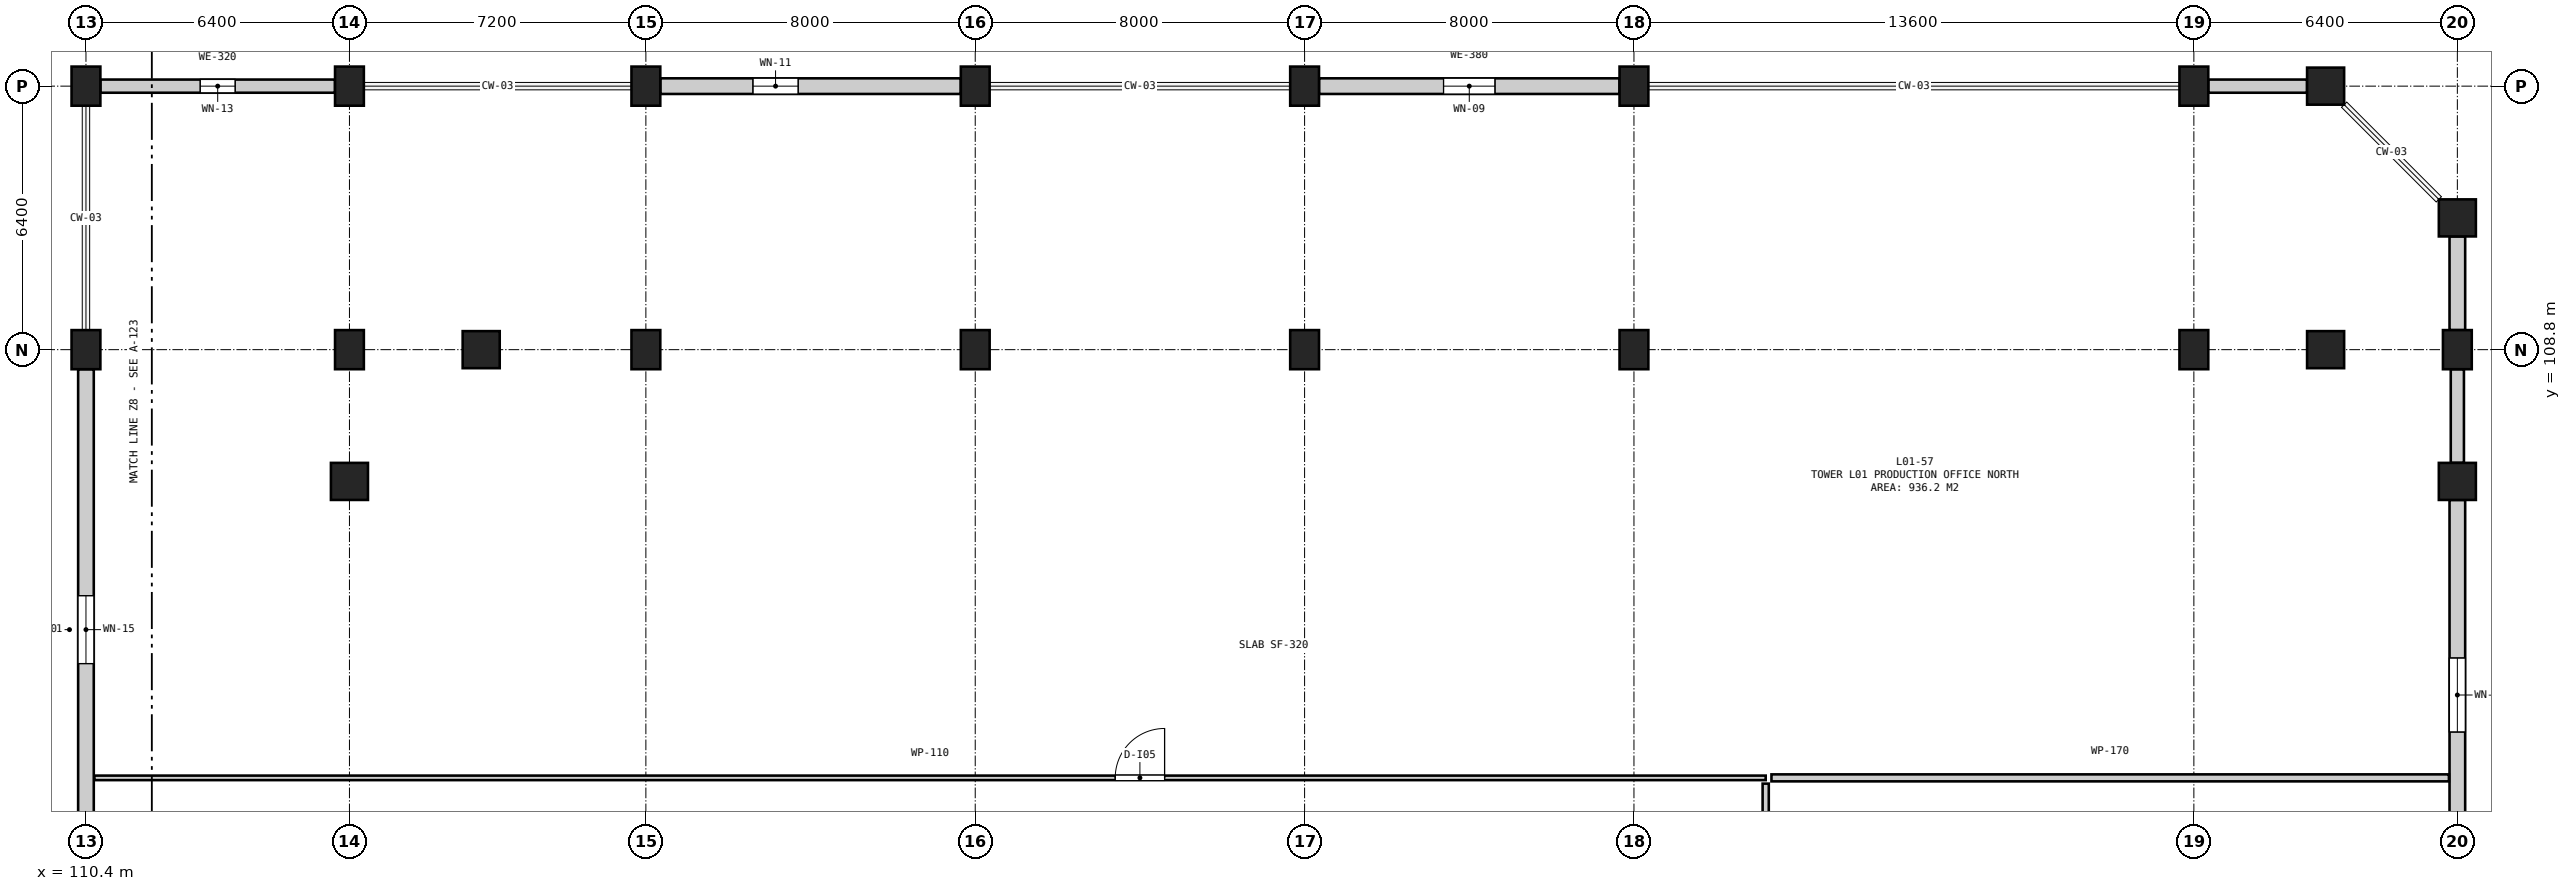
"""IFC4 building model, lengths in metres.
Left out: names, types, materials, properties, quantities, classifications, styles, units other than length and angle.
Written with IfcOpenShell. Run it as: python <this file> out.ifc"""

import sys

from ifc_helpers import new_model, si_unit, direction, frame, frame_2d, origin, origin_2d, place, context, subcontext, project, spatial, rectangle, circle, extrude, element, fill, save


model = new_model("IFC4")
c1 = context("Model", 3, precision=1e-05, world=origin(), true_north=direction((0.0, 1.0)))
c2 = subcontext(c1, "Body", "Model", "MODEL_VIEW")
j1 = project(units=[si_unit("LENGTHUNIT", "METRE"), si_unit("PLANEANGLEUNIT", "RADIAN")], contexts=[c1])
p1 = place(None, origin())
s1 = spatial("IfcSite", under=j1, at=p1, CompositionType="ELEMENT")
p2 = place(p1, origin())
s2 = spatial("IfcBuilding", under=s1, at=p2, CompositionType="ELEMENT")
p3 = place(p2, frame((0.0, 0.0, 5.4)))
s3 = spatial("IfcBuildingStorey", under=s2, at=p3, CompositionType="ELEMENT", Elevation=5.4)
for number, where, z_axis, x_axis in (
    (1, (110.4, 108.8, 0.0), (0.0, 0.0, 1.0), (1.0, 0.0, 0.0)),
    (2, (110.4, 115.2, 0.0), (0.0, 0.0, 1.0), (1.0, 0.0, 0.0)),
):
    element("IfcColumn", number, at=place(p3, frame(where, z_axis=z_axis, x_axis=x_axis)), inside=s3, PredefinedType="COLUMN", context=c2, shape_type="SweptSolid", body=[
        extrude(rectangle(XDim=0.7, YDim=0.95, at=origin_2d()), origin(), (0.0, 0.0, 1.0), 5.4),
    ])
p4 = place(p3, frame((116.8, 105.6, 0.0), z_axis=(0.0, 0.0, 1.0), x_axis=(1.0, 0.0, 0.0)))
e3 = element("IfcColumn", 3, at=p4, inside=s3, PredefinedType="COLUMN", context=c2, shape_type="SweptSolid", body=[
    extrude(circle(Radius=0.45, at=origin_2d()), origin(), (0.0, 0.0, 1.0), 5.4),
])
for number, where, z_axis, x_axis in (
    (4, (116.8, 108.8, 0.0), (0.0, 0.0, 1.0), (1.0, 0.0, 0.0)),
    (5, (116.8, 115.2, 0.0), (0.0, 0.0, 1.0), (1.0, 0.0, 0.0)),
):
    element("IfcColumn", number, at=place(p3, frame(where, z_axis=z_axis, x_axis=x_axis)), inside=s3, PredefinedType="COLUMN", context=c2, shape_type="SweptSolid", body=[
        extrude(rectangle(XDim=0.7, YDim=0.95, at=origin_2d()), origin(), (0.0, 0.0, 1.0), 5.4),
    ])
p5 = place(p3, frame((120.0, 108.8, 0.0), z_axis=(0.0, 0.0, 1.0), x_axis=(1.0, 0.0, 0.0)))
e6 = element("IfcColumn", 6, at=p5, inside=s3, PredefinedType="COLUMN", context=c2, shape_type="SweptSolid", body=[
    extrude(circle(Radius=0.45, at=origin_2d()), origin(), (0.0, 0.0, 1.0), 5.4),
])
for number, where, z_axis, x_axis in (
    (7, (124.0, 108.8, 0.0), (0.0, 0.0, 1.0), (1.0, 0.0, 0.0)),
    (8, (124.0, 115.2, 0.0), (0.0, 0.0, 1.0), (1.0, 0.0, 0.0)),
    (9, (132.0, 108.8, 0.0), (0.0, 0.0, 1.0), (1.0, 0.0, 0.0)),
    (10, (132.0, 115.2, 0.0), (0.0, 0.0, 1.0), (1.0, 0.0, 0.0)),
    (11, (140.0, 108.8, 0.0), (0.0, 0.0, 1.0), (1.0, 0.0, 0.0)),
    (12, (140.0, 115.2, 0.0), (0.0, 0.0, 1.0), (1.0, 0.0, 0.0)),
    (13, (148.0, 108.8, 0.0), (0.0, 0.0, 1.0), (1.0, 0.0, 0.0)),
    (14, (148.0, 115.2, 0.0), (0.0, 0.0, 1.0), (1.0, 0.0, 0.0)),
    (15, (161.6, 108.8, 0.0), (0.0, 0.0, 1.0), (1.0, 0.0, 0.0)),
    (16, (161.6, 115.2, 0.0), (0.0, 0.0, 1.0), (1.0, 0.0, 0.0)),
):
    element("IfcColumn", number, at=place(p3, frame(where, z_axis=z_axis, x_axis=x_axis)), inside=s3, PredefinedType="COLUMN", context=c2, shape_type="SweptSolid", body=[
        extrude(rectangle(XDim=0.7, YDim=0.95, at=origin_2d()), origin(), (0.0, 0.0, 1.0), 5.4),
    ])
for number, where, z_axis, x_axis in (
    (17, (164.8, 108.8, 0.0), (0.0, 0.0, 1.0), (1.0, 0.0, 0.0)),
    (18, (164.8, 115.2, 0.0), (0.0, 0.0, 1.0), (1.0, 0.0, 0.0)),
    (19, (168.0, 105.6, 0.0), (0.0, 0.0, 1.0), (1.0, 0.0, 0.0)),
):
    element("IfcColumn", number, at=place(p3, frame(where, z_axis=z_axis, x_axis=x_axis)), inside=s3, PredefinedType="COLUMN", context=c2, shape_type="SweptSolid", body=[
        extrude(circle(Radius=0.45, at=origin_2d()), origin(), (0.0, 0.0, 1.0), 5.4),
    ])
p6 = place(p3, frame((168.0, 108.8, 0.0), z_axis=(0.0, 0.0, 1.0), x_axis=(1.0, 0.0, 0.0)))
e20 = element("IfcColumn", 20, at=p6, inside=s3, PredefinedType="COLUMN", context=c2, shape_type="SweptSolid", body=[
    extrude(rectangle(XDim=0.7, YDim=0.95, at=origin_2d()), origin(), (0.0, 0.0, 1.0), 5.4),
])
p7 = place(p3, frame((168.0, 112.0, 0.0), z_axis=(0.0, 0.0, 1.0), x_axis=(1.0, 0.0, 0.0)))
e21 = element("IfcColumn", 21, at=p7, inside=s3, PredefinedType="COLUMN", context=c2, shape_type="SweptSolid", body=[
    extrude(circle(Radius=0.45, at=origin_2d()), origin(), (0.0, 0.0, 1.0), 5.4),
])
p8 = place(p3, frame((168.0, 95.675, 0.0), z_axis=(0.0, 0.0, 1.0), x_axis=(0.0, 1.0, 0.0)))
e22 = element("IfcWall", 22, at=p8, inside=s3, PredefinedType="SOLIDWALL", context=c2, shape_type="SweptSolid", body=[
    extrude(rectangle(XDim=9.475, YDim=0.38, at=frame_2d((4.737, 0.0))), origin(), (0.0, 0.0, 1.0), 4.425),
])
p9 = place(p8, frame((3.837, 0.0, 0.9)))
e23 = element("IfcOpeningElement", 23, at=p9, cuts=e22, PredefinedType="OPENING", context=c2, shape_type="SweptSolid", body=[
    extrude(rectangle(XDim=1.8, YDim=2.1, at=frame_2d((0.9, 1.05))), frame((0.0, 0.202, 0.0), z_axis=(0.0, -1.0, 0.0), x_axis=(1.0, 0.0, 0.0)), (0.0, 0.0, 1.0), 0.404),
])
p10 = place(p3, frame((168.0, 106.05, 0.0), z_axis=(0.0, 0.0, 1.0), x_axis=(0.0, 1.0, 0.0)))
e24 = element("IfcWall", 24, at=p10, inside=s3, PredefinedType="SOLIDWALL", context=c2, shape_type="SweptSolid", body=[
    extrude(rectangle(XDim=2.275, YDim=0.32, at=frame_2d((1.137, 0.0))), origin(), (0.0, 0.0, 1.0), 4.425),
])
p11 = place(p3, frame((168.0, 109.275, 0.0), z_axis=(0.0, 0.0, 1.0), x_axis=(0.0, 1.0, 0.0)))
e25 = element("IfcWall", 25, at=p11, inside=s3, PredefinedType="SOLIDWALL", context=c2, shape_type="SweptSolid", body=[
    extrude(rectangle(XDim=2.275, YDim=0.38, at=frame_2d((1.138, 0.0))), origin(), (0.0, 0.0, 1.0), 4.44),
])
p12 = place(p3, frame((164.35, 115.2, 0.0), z_axis=(0.0, 0.0, 1.0), x_axis=(-1.0, 0.0, 0.0)))
e26 = element("IfcWall", 26, at=p12, inside=s3, PredefinedType="SOLIDWALL", context=c2, shape_type="SweptSolid", body=[
    extrude(rectangle(XDim=2.4, YDim=0.32, at=frame_2d((1.2, 0.0))), origin(), (0.0, 0.0, 1.0), 4.44),
])
p13 = place(p3, frame((147.65, 115.2, 0.0), z_axis=(0.0, 0.0, 1.0), x_axis=(-1.0, 0.0, 0.0)))
e27 = element("IfcWall", 27, at=p13, inside=s3, PredefinedType="SOLIDWALL", context=c2, shape_type="SweptSolid", body=[
    extrude(rectangle(XDim=7.3, YDim=0.38, at=frame_2d((3.65, 0.0))), origin(), (0.0, 0.0, 1.0), 4.44),
])
p14 = place(p13, frame((3.025, 0.0, 0.9)))
e28 = element("IfcOpeningElement", 28, at=p14, cuts=e27, PredefinedType="OPENING", context=c2, shape_type="SweptSolid", body=[
    extrude(rectangle(XDim=1.25, YDim=1.9, at=frame_2d((0.625, 0.95))), frame((0.0, 0.202, 0.0), z_axis=(0.0, -1.0, 0.0), x_axis=(1.0, 0.0, 0.0)), (0.0, 0.0, 1.0), 0.404),
])
p15 = place(p3, frame((131.65, 115.2, 0.0), z_axis=(0.0, 0.0, 1.0), x_axis=(-1.0, 0.0, 0.0)))
e29 = element("IfcWall", 29, at=p15, inside=s3, PredefinedType="SOLIDWALL", context=c2, shape_type="SweptSolid", body=[
    extrude(rectangle(XDim=7.3, YDim=0.38, at=frame_2d((3.65, 0.0))), origin(), (0.0, 0.0, 1.0), 4.425),
])
p16 = place(p15, frame((3.95, 0.0, 0.9)))
e30 = element("IfcOpeningElement", 30, at=p16, cuts=e29, PredefinedType="OPENING", context=c2, shape_type="SweptSolid", body=[
    extrude(rectangle(XDim=1.1, YDim=1.55, at=frame_2d((0.55, 0.775))), frame((0.0, 0.202, 0.0), z_axis=(0.0, -1.0, 0.0), x_axis=(1.0, 0.0, 0.0)), (0.0, 0.0, 1.0), 0.404),
])
p17 = place(p3, frame((116.45, 115.2, 0.0), z_axis=(0.0, 0.0, 1.0), x_axis=(-1.0, 0.0, 0.0)))
e31 = element("IfcWall", 31, at=p17, inside=s3, PredefinedType="SOLIDWALL", context=c2, shape_type="SweptSolid", body=[
    extrude(rectangle(XDim=5.7, YDim=0.32, at=frame_2d((2.85, 0.0))), origin(), (0.0, 0.0, 1.0), 4.44),
])
p18 = place(p17, frame((2.425, 0.0, 0.9)))
e32 = element("IfcOpeningElement", 32, at=p18, cuts=e31, PredefinedType="OPENING", context=c2, shape_type="SweptSolid", body=[
    extrude(rectangle(XDim=0.85, YDim=1.35, at=frame_2d((0.425, 0.675))), frame((0.0, 0.172, 0.0), z_axis=(0.0, -1.0, 0.0), x_axis=(1.0, 0.0, 0.0)), (0.0, 0.0, 1.0), 0.344),
])
p19 = place(p3, frame((110.4, 108.325, 0.0), z_axis=(0.0, 0.0, 1.0), x_axis=(0.0, -1.0, 0.0)))
e33 = element("IfcWall", 33, at=p19, inside=s3, PredefinedType="SOLIDWALL", context=c2, shape_type="SweptSolid", body=[
    extrude(rectangle(XDim=12.65, YDim=0.38, at=frame_2d((6.325, 0.0))), origin(), (0.0, 0.0, 1.0), 4.425),
])
p20 = place(p19, frame((5.5, 0.0, 0.9)))
e34 = element("IfcOpeningElement", 34, at=p20, cuts=e33, PredefinedType="OPENING", context=c2, shape_type="SweptSolid", body=[
    extrude(rectangle(XDim=1.65, YDim=2.2, at=frame_2d((0.825, 1.1))), frame((0.0, 0.202, 0.0), z_axis=(0.0, -1.0, 0.0), x_axis=(1.0, 0.0, 0.0)), (0.0, 0.0, 1.0), 0.404),
])
p21 = place(p3, frame((151.34, 98.4, 0.0), z_axis=(0.0, 0.0, 1.0), x_axis=(1.0, 0.0, 0.0)))
e35 = element("IfcWall", 35, at=p21, inside=s3, PredefinedType="PARTITIONING", context=c2, shape_type="SweptSolid", body=[
    extrude(rectangle(XDim=16.455, YDim=0.17, at=frame_2d((8.228, 0.0))), origin(), (0.0, 0.0, 1.0), 5.1),
])
p22 = place(p3, frame((151.2, 76.14, 0.0), z_axis=(0.0, 0.0, 1.0), x_axis=(0.0, 1.0, 0.0)))
e36 = element("IfcWall", 36, at=p22, inside=s3, PredefinedType="PARTITIONING", context=c2, shape_type="SweptSolid", body=[
    extrude(rectangle(XDim=22.12, YDim=0.15, at=frame_2d((11.06, 0.0))), origin(), (0.0, 0.0, 1.0), 5.1),
])
p23 = place(p22, frame((10.46, 0.0, 0.0)))
e37 = element("IfcOpeningElement", 37, at=p23, cuts=e36, PredefinedType="OPENING", context=c2, shape_type="SweptSolid", body=[
    extrude(rectangle(XDim=1.2, YDim=2.15, at=frame_2d((0.6, 1.075))), frame((0.0, 0.087, 0.0), z_axis=(0.0, -1.0, 0.0), x_axis=(1.0, 0.0, 0.0)), (0.0, 0.0, 1.0), 0.174),
])
p24 = place(p3, frame((110.605, 98.4, 0.0), z_axis=(0.0, 0.0, 1.0), x_axis=(1.0, 0.0, 0.0)))
e38 = element("IfcWall", 38, at=p24, inside=s3, PredefinedType="PARTITIONING", context=c2, shape_type="SweptSolid", body=[
    extrude(rectangle(XDim=40.595, YDim=0.11, at=frame_2d((20.297, 0.0))), origin(), (0.0, 0.0, 1.0), 5.1),
])
p25 = place(p24, frame((24.795, 0.0, 0.0)))
e39 = element("IfcOpeningElement", 39, at=p25, cuts=e38, PredefinedType="OPENING", context=c2, shape_type="SweptSolid", body=[
    extrude(rectangle(XDim=1.2, YDim=2.15, at=frame_2d((0.6, 1.075))), frame((0.0, 0.067, 0.0), z_axis=(0.0, -1.0, 0.0), x_axis=(1.0, 0.0, 0.0)), (0.0, 0.0, 1.0), 0.134),
])
p26 = place(p9, origin())
e40 = element("IfcWindow", 40, at=p26, inside=s3, PartitioningType="DOUBLE_PANEL_VERTICAL", PredefinedType="WINDOW", context=c2, shape_type="SweptSolid", body=[
    extrude(rectangle(XDim=1.8, YDim=2.1, at=frame_2d((0.9, 1.05))), frame((0.0, 0.03, 0.0), z_axis=(0.0, -1.0, 0.0), x_axis=(1.0, 0.0, 0.0)), (0.0, 0.0, 1.0), 0.06),
])
fill(e23, e40)
p27 = place(p14, origin())
e41 = element("IfcWindow", 41, at=p27, inside=s3, PartitioningType="SINGLE_PANEL", PredefinedType="WINDOW", context=c2, shape_type="SweptSolid", body=[
    extrude(rectangle(XDim=1.25, YDim=1.9, at=frame_2d((0.625, 0.95))), frame((0.0, 0.03, 0.0), z_axis=(0.0, -1.0, 0.0), x_axis=(1.0, 0.0, 0.0)), (0.0, 0.0, 1.0), 0.06),
])
fill(e28, e41)
p28 = place(p16, origin())
e42 = element("IfcWindow", 42, at=p28, inside=s3, PartitioningType="SINGLE_PANEL", PredefinedType="WINDOW", context=c2, shape_type="SweptSolid", body=[
    extrude(rectangle(XDim=1.1, YDim=1.55, at=frame_2d((0.55, 0.775))), frame((0.0, 0.03, 0.0), z_axis=(0.0, -1.0, 0.0), x_axis=(1.0, 0.0, 0.0)), (0.0, 0.0, 1.0), 0.06),
])
fill(e30, e42)
p29 = place(p18, origin())
e43 = element("IfcWindow", 43, at=p29, inside=s3, PartitioningType="SINGLE_PANEL", PredefinedType="WINDOW", context=c2, shape_type="SweptSolid", body=[
    extrude(rectangle(XDim=0.85, YDim=1.35, at=frame_2d((0.425, 0.675))), frame((0.0, 0.03, 0.0), z_axis=(0.0, -1.0, 0.0), x_axis=(1.0, 0.0, 0.0)), (0.0, 0.0, 1.0), 0.06),
])
fill(e32, e43)
p30 = place(p20, origin())
e44 = element("IfcWindow", 44, at=p30, inside=s3, PartitioningType="TRIPLE_PANEL_HORIZONTAL", PredefinedType="WINDOW", context=c2, shape_type="SweptSolid", body=[
    extrude(rectangle(XDim=1.65, YDim=2.2, at=frame_2d((0.825, 1.1))), frame((0.0, 0.03, 0.0), z_axis=(0.0, -1.0, 0.0), x_axis=(1.0, 0.0, 0.0)), (0.0, 0.0, 1.0), 0.06),
])
fill(e34, e44)
p31 = place(p25, origin())
e45 = element("IfcDoor", 45, at=p31, inside=s3, OperationType="SINGLE_SWING_RIGHT", PredefinedType="DOOR", context=c2, shape_type="SweptSolid", body=[
    extrude(rectangle(XDim=1.2, YDim=2.15, at=frame_2d((0.6, 1.075))), frame((0.0, 0.025, 0.0), z_axis=(0.0, -1.0, 0.0), x_axis=(1.0, 0.0, 0.0)), (0.0, 0.0, 1.0), 0.05),
])
fill(e39, e45)
save(model, sys.argv[1])
